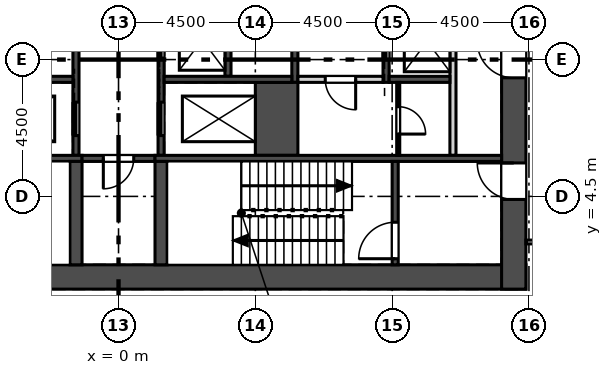
"""IFC4 building model, lengths in metres.
Left out: names, types, materials, properties, quantities, classifications, styles, units other than length and angle.
Written with IfcOpenShell. Run it as: python <this file> out.ifc"""

import sys

from ifc_helpers import new_model, si_unit, direction, frame, frame_2d, origin, place, context, subcontext, project, spatial, rectangle, extrude, element, fill, save


model = new_model("IFC4")
c1 = context("Model", 3, precision=1e-05, world=origin(), true_north=direction((0.0, 1.0)))
c2 = subcontext(c1, "Body", "Model", "MODEL_VIEW")
j1 = project(units=[si_unit("LENGTHUNIT", "METRE"), si_unit("PLANEANGLEUNIT", "RADIAN")], contexts=[c1])
p1 = place(None, origin())
s1 = spatial("IfcSite", under=j1, at=p1, CompositionType="ELEMENT")
p2 = place(p1, origin())
s2 = spatial("IfcBuilding", under=s1, at=p2, CompositionType="ELEMENT")
p3 = place(p2, frame((0.0, 0.0, 335.1)))
s3 = spatial("IfcBuildingStorey", under=s2, at=p3, CompositionType="ELEMENT", Elevation=335.1)
p4 = place(p3, frame((-13.4, 1.85, 0.0), z_axis=(0.0, 0.0, 1.0), x_axis=(1.0, 0.0, 0.0)))
e1 = element("IfcWall", 1, at=p4, inside=s3, PredefinedType="SHEAR", context=c2, shape_type="SweptSolid", body=[
    extrude(rectangle(XDim=26.8, YDim=0.8, at=frame_2d((13.4, 0.0))), origin(), (0.0, 0.0, 1.0), 4.2),
])
p5 = place(p3, frame((13.0, 1.45, 0.0), z_axis=(0.0, 0.0, 1.0), x_axis=(0.0, 1.0, 0.0)))
e2 = element("IfcWall", 2, at=p5, inside=s3, PredefinedType="SHEAR", context=c2, shape_type="SweptSolid", body=[
    extrude(rectangle(XDim=9.442, YDim=0.8, at=frame_2d((4.721, 0.0))), origin(), (0.0, 0.0, 1.0), 4.2),
])
p6 = place(p5, frame((2.95, 0.0, 0.0)))
e3 = element("IfcOpeningElement", 3, at=p6, cuts=e2, PredefinedType="OPENING", context=c2, shape_type="SweptSolid", body=[
    extrude(rectangle(XDim=1.2, YDim=2.1, at=frame_2d((0.6, 1.05))), frame((0.0, 0.41, 0.0), z_axis=(0.0, -1.0, 0.0), x_axis=(1.0, 0.0, 0.0)), (0.0, 0.0, 1.0), 0.82),
])
p7 = place(p5, frame((6.95, 0.0, 0.0)))
e4 = element("IfcOpeningElement", 4, at=p7, cuts=e2, PredefinedType="OPENING", context=c2, shape_type="SweptSolid", body=[
    extrude(rectangle(XDim=1.2, YDim=2.1, at=frame_2d((0.6, 1.05))), frame((0.0, 0.41, 0.0), z_axis=(0.0, -1.0, 0.0), x_axis=(1.0, 0.0, 0.0)), (0.0, 0.0, 1.0), 0.82),
])
p8 = place(p3, frame((23.788, 7.709, 0.0), z_axis=(0.0, 0.0, 1.0), x_axis=(-0.500001731347, 0.866024404189, 0.0)))
e5 = element("IfcWall", 5, at=p8, inside=s3, PredefinedType="SOLIDWALL", context=c2, shape_type="SweptSolid", body=[
    extrude(rectangle(XDim=38.87, YDim=0.34, at=frame_2d((19.435, 0.0))), origin(), (0.0, 0.0, 1.0), 3.8),
])
p9 = place(p8, frame((3.218, 0.0, 0.9)))
e6 = element("IfcOpeningElement", 6, at=p9, cuts=e5, PredefinedType="OPENING", context=c2, shape_type="SweptSolid", body=[
    extrude(rectangle(XDim=1.885, YDim=2.6, at=frame_2d((0.942, 1.3))), frame((0.0, 0.18, 0.0), z_axis=(0.0, -1.0, 0.0), x_axis=(1.0, 0.0, 0.0)), (0.0, 0.0, 1.0), 0.36),
])
p10 = place(p8, frame((6.218, 0.0, 0.9)))
e7 = element("IfcOpeningElement", 7, at=p10, cuts=e5, PredefinedType="OPENING", context=c2, shape_type="SweptSolid", body=[
    extrude(rectangle(XDim=1.885, YDim=2.6, at=frame_2d((0.942, 1.3))), frame((0.0, 0.18, 0.0), z_axis=(0.0, -1.0, 0.0), x_axis=(1.0, 0.0, 0.0)), (0.0, 0.0, 1.0), 0.36),
])
p11 = place(p8, frame((9.218, 0.0, 0.9)))
e8 = element("IfcOpeningElement", 8, at=p11, cuts=e5, PredefinedType="OPENING", context=c2, shape_type="SweptSolid", body=[
    extrude(rectangle(XDim=1.885, YDim=2.6, at=frame_2d((0.942, 1.3))), frame((0.0, 0.18, 0.0), z_axis=(0.0, -1.0, 0.0), x_axis=(1.0, 0.0, 0.0)), (0.0, 0.0, 1.0), 0.36),
])
p12 = place(p8, frame((12.218, 0.0, 0.9)))
e9 = element("IfcOpeningElement", 9, at=p12, cuts=e5, PredefinedType="OPENING", context=c2, shape_type="SweptSolid", body=[
    extrude(rectangle(XDim=1.885, YDim=2.6, at=frame_2d((0.942, 1.3))), frame((0.0, 0.18, 0.0), z_axis=(0.0, -1.0, 0.0), x_axis=(1.0, 0.0, 0.0)), (0.0, 0.0, 1.0), 0.36),
])
p13 = place(p8, frame((15.218, 0.0, 0.9)))
e10 = element("IfcOpeningElement", 10, at=p13, cuts=e5, PredefinedType="OPENING", context=c2, shape_type="SweptSolid", body=[
    extrude(rectangle(XDim=1.885, YDim=2.6, at=frame_2d((0.942, 1.3))), frame((0.0, 0.18, 0.0), z_axis=(0.0, -1.0, 0.0), x_axis=(1.0, 0.0, 0.0)), (0.0, 0.0, 1.0), 0.36),
])
p14 = place(p8, frame((18.218, 0.0, 0.9)))
e11 = element("IfcOpeningElement", 11, at=p14, cuts=e5, PredefinedType="OPENING", context=c2, shape_type="SweptSolid", body=[
    extrude(rectangle(XDim=1.885, YDim=2.6, at=frame_2d((0.942, 1.3))), frame((0.0, 0.18, 0.0), z_axis=(0.0, -1.0, 0.0), x_axis=(1.0, 0.0, 0.0)), (0.0, 0.0, 1.0), 0.36),
])
p15 = place(p8, frame((21.218, 0.0, 0.9)))
e12 = element("IfcOpeningElement", 12, at=p15, cuts=e5, PredefinedType="OPENING", context=c2, shape_type="SweptSolid", body=[
    extrude(rectangle(XDim=1.885, YDim=2.6, at=frame_2d((0.942, 1.3))), frame((0.0, 0.18, 0.0), z_axis=(0.0, -1.0, 0.0), x_axis=(1.0, 0.0, 0.0)), (0.0, 0.0, 1.0), 0.36),
])
p16 = place(p8, frame((24.218, 0.0, 0.9)))
e13 = element("IfcOpeningElement", 13, at=p16, cuts=e5, PredefinedType="OPENING", context=c2, shape_type="SweptSolid", body=[
    extrude(rectangle(XDim=1.885, YDim=2.6, at=frame_2d((0.942, 1.3))), frame((0.0, 0.18, 0.0), z_axis=(0.0, -1.0, 0.0), x_axis=(1.0, 0.0, 0.0)), (0.0, 0.0, 1.0), 0.36),
])
p17 = place(p8, frame((27.218, 0.0, 0.9)))
e14 = element("IfcOpeningElement", 14, at=p17, cuts=e5, PredefinedType="OPENING", context=c2, shape_type="SweptSolid", body=[
    extrude(rectangle(XDim=1.885, YDim=2.6, at=frame_2d((0.942, 1.3))), frame((0.0, 0.18, 0.0), z_axis=(0.0, -1.0, 0.0), x_axis=(1.0, 0.0, 0.0)), (0.0, 0.0, 1.0), 0.36),
])
p18 = place(p8, frame((30.218, 0.0, 0.9)))
e15 = element("IfcOpeningElement", 15, at=p18, cuts=e5, PredefinedType="OPENING", context=c2, shape_type="SweptSolid", body=[
    extrude(rectangle(XDim=1.885, YDim=2.6, at=frame_2d((0.942, 1.3))), frame((0.0, 0.18, 0.0), z_axis=(0.0, -1.0, 0.0), x_axis=(1.0, 0.0, 0.0)), (0.0, 0.0, 1.0), 0.36),
])
p19 = place(p8, frame((33.218, 0.0, 0.9)))
e16 = element("IfcOpeningElement", 16, at=p19, cuts=e5, PredefinedType="OPENING", context=c2, shape_type="SweptSolid", body=[
    extrude(rectangle(XDim=1.885, YDim=2.6, at=frame_2d((0.942, 1.3))), frame((0.0, 0.18, 0.0), z_axis=(0.0, -1.0, 0.0), x_axis=(1.0, 0.0, 0.0)), (0.0, 0.0, 1.0), 0.36),
])
p20 = place(p8, frame((1.051, 0.0, 0.9)))
e17 = element("IfcOpeningElement", 17, at=p20, cuts=e5, PredefinedType="OPENING", context=c2, shape_type="SweptSolid", body=[
    extrude(rectangle(XDim=1.115, YDim=2.4, at=frame_2d((0.558, 1.2))), frame((0.0, 0.18, 0.0), z_axis=(0.0, -1.0, 0.0), x_axis=(1.0, 0.0, 0.0)), (0.0, 0.0, 1.0), 0.36),
])
p21 = place(p8, frame((36.429, 0.0, 0.9)))
e18 = element("IfcOpeningElement", 18, at=p21, cuts=e5, PredefinedType="OPENING", context=c2, shape_type="SweptSolid", body=[
    extrude(rectangle(XDim=1.115, YDim=2.4, at=frame_2d((0.558, 1.2))), frame((0.0, 0.18, 0.0), z_axis=(0.0, -1.0, 0.0), x_axis=(1.0, 0.0, 0.0)), (0.0, 0.0, 1.0), 0.36),
])
p22 = place(p3, frame((11.0, 5.85, 0.0), z_axis=(0.0, 0.0, 1.0), x_axis=(0.0, 1.0, 0.0)))
e19 = element("IfcWall", 19, at=p22, inside=s3, PredefinedType="SOLIDWALL", context=c2, shape_type="SweptSolid", body=[
    extrude(rectangle(XDim=7.4, YDim=0.2, at=frame_2d((3.7, 0.0))), origin(), (0.0, 0.0, 1.0), 3.8),
])
p23 = place(p3, frame((8.8, 8.25, -0.4), z_axis=(0.0, 0.0, 1.0), x_axis=(0.0, 1.0, 0.0)))
e20 = element("IfcWall", 20, at=p23, inside=s3, PredefinedType="SOLIDWALL", context=c2, shape_type="SweptSolid", body=[
    extrude(rectangle(XDim=5.2, YDim=0.2, at=frame_2d((2.6, 0.0))), origin(), (0.0, 0.0, 1.0), 4.2),
])
p24 = place(p23, frame((0.75, 0.0, 0.4)))
e21 = element("IfcOpeningElement", 21, at=p24, cuts=e20, PredefinedType="OPENING", context=c2, shape_type="SweptSolid", body=[
    extrude(rectangle(XDim=1.2, YDim=2.1, at=frame_2d((0.6, 1.05))), frame((0.0, 0.11, 0.0), z_axis=(0.0, -1.0, 0.0), x_axis=(1.0, 0.0, 0.0)), (0.0, 0.0, 1.0), 0.22),
])
p25 = place(p23, frame((3.25, 0.0, 0.4)))
e22 = element("IfcOpeningElement", 22, at=p25, cuts=e20, PredefinedType="OPENING", context=c2, shape_type="SweptSolid", body=[
    extrude(rectangle(XDim=1.2, YDim=2.1, at=frame_2d((0.6, 1.05))), frame((0.0, 0.11, 0.0), z_axis=(0.0, -1.0, 0.0), x_axis=(1.0, 0.0, 0.0)), (0.0, 0.0, 1.0), 0.22),
])
p26 = place(p3, frame((5.8, 8.25, -0.4), z_axis=(0.0, 0.0, 1.0), x_axis=(0.0, 1.0, 0.0)))
e23 = element("IfcWall", 23, at=p26, inside=s3, PredefinedType="SOLIDWALL", context=c2, shape_type="SweptSolid", body=[
    extrude(rectangle(XDim=8.0, YDim=0.2, at=frame_2d((4.0, 0.0))), origin(), (0.0, 0.0, 1.0), 4.2),
])
p27 = place(p26, frame((3.5, 0.0, 0.4)))
e24 = element("IfcOpeningElement", 24, at=p27, cuts=e23, PredefinedType="OPENING", context=c2, shape_type="SweptSolid", body=[
    extrude(rectangle(XDim=1.0, YDim=2.1, at=frame_2d((0.5, 1.05))), frame((0.0, 0.11, 0.0), z_axis=(0.0, -1.0, 0.0), x_axis=(1.0, 0.0, 0.0)), (0.0, 0.0, 1.0), 0.22),
])
p28 = place(p3, frame((3.6, 8.45, -0.4), z_axis=(0.0, 0.0, 1.0), x_axis=(0.0, 1.0, 0.0)))
e25 = element("IfcWall", 25, at=p28, inside=s3, PredefinedType="SOLIDWALL", context=c2, shape_type="SweptSolid", body=[
    extrude(rectangle(XDim=7.8, YDim=0.2, at=frame_2d((3.9, 0.0))), origin(), (0.0, 0.0, 1.0), 4.2),
])
p29 = place(p3, frame((-1.4, 5.85, -0.4), z_axis=(0.0, 0.0, 1.0), x_axis=(0.0, 1.0, 0.0)))
e26 = element("IfcWall", 26, at=p29, inside=s3, PredefinedType="SOLIDWALL", context=c2, shape_type="SweptSolid", body=[
    extrude(rectangle(XDim=11.75, YDim=0.2, at=frame_2d((5.875, 0.0))), origin(), (0.0, 0.0, 1.0), 4.2),
])
p30 = place(p29, frame((0.65, 0.0, 0.4)))
e27 = element("IfcOpeningElement", 27, at=p30, cuts=e26, PredefinedType="OPENING", context=c2, shape_type="SweptSolid", body=[
    extrude(rectangle(XDim=1.1, YDim=2.1, at=frame_2d((0.55, 1.05))), frame((0.0, 0.11, 0.0), z_axis=(0.0, -1.0, 0.0), x_axis=(1.0, 0.0, 0.0)), (0.0, 0.0, 1.0), 0.22),
])
p31 = place(p29, frame((4.6, 0.0, 0.4)))
e28 = element("IfcOpeningElement", 28, at=p31, cuts=e26, PredefinedType="OPENING", context=c2, shape_type="SweptSolid", body=[
    extrude(rectangle(XDim=1.0, YDim=2.1, at=frame_2d((0.5, 1.05))), frame((0.0, 0.11, 0.0), z_axis=(0.0, -1.0, 0.0), x_axis=(1.0, 0.0, 0.0)), (0.0, 0.0, 1.0), 0.22),
])
p32 = place(p29, frame((8.5, 0.0, 0.4)))
e29 = element("IfcOpeningElement", 29, at=p32, cuts=e26, PredefinedType="OPENING", context=c2, shape_type="SweptSolid", body=[
    extrude(rectangle(XDim=1.0, YDim=2.1, at=frame_2d((0.5, 1.05))), frame((0.0, 0.11, 0.0), z_axis=(0.0, -1.0, 0.0), x_axis=(1.0, 0.0, 0.0)), (0.0, 0.0, 1.0), 0.22),
])
p33 = place(p3, frame((1.4, 5.85, -0.4), z_axis=(0.0, 0.0, 1.0), x_axis=(0.0, 1.0, 0.0)))
e30 = element("IfcWall", 30, at=p33, inside=s3, PredefinedType="SOLIDWALL", context=c2, shape_type="SweptSolid", body=[
    extrude(rectangle(XDim=11.75, YDim=0.2, at=frame_2d((5.875, 0.0))), origin(), (0.0, 0.0, 1.0), 4.2),
])
p34 = place(p33, frame((3.2, 0.0, 0.4)))
e31 = element("IfcOpeningElement", 31, at=p34, cuts=e30, PredefinedType="OPENING", context=c2, shape_type="SweptSolid", body=[
    extrude(rectangle(XDim=1.2, YDim=2.1, at=frame_2d((0.6, 1.05))), frame((0.0, 0.11, 0.0), z_axis=(0.0, -1.0, 0.0), x_axis=(1.0, 0.0, 0.0)), (0.0, 0.0, 1.0), 0.22),
])
p35 = place(p33, frame((0.65, 0.0, 0.4)))
e32 = element("IfcOpeningElement", 32, at=p35, cuts=e30, PredefinedType="OPENING", context=c2, shape_type="SweptSolid", body=[
    extrude(rectangle(XDim=1.1, YDim=2.1, at=frame_2d((0.55, 1.05))), frame((0.0, 0.11, 0.0), z_axis=(0.0, -1.0, 0.0), x_axis=(1.0, 0.0, 0.0)), (0.0, 0.0, 1.0), 0.22),
])
p36 = place(p33, frame((5.9, 0.0, 0.4)))
e33 = element("IfcOpeningElement", 33, at=p36, cuts=e30, PredefinedType="OPENING", context=c2, shape_type="SweptSolid", body=[
    extrude(rectangle(XDim=1.0, YDim=2.1, at=frame_2d((0.5, 1.05))), frame((0.0, 0.11, 0.0), z_axis=(0.0, -1.0, 0.0), x_axis=(1.0, 0.0, 0.0)), (0.0, 0.0, 1.0), 0.22),
])
p37 = place(p3, frame((5.2, 5.85, -0.4), z_axis=(0.0, 0.0, 1.0), x_axis=(0.0, 1.0, 0.0)))
e34 = element("IfcWall", 34, at=p37, inside=s3, PredefinedType="SOLIDWALL", context=c2, shape_type="SweptSolid", body=[
    extrude(rectangle(XDim=2.4, YDim=1.4, at=frame_2d((1.2, 0.0))), origin(), (0.0, 0.0, 1.0), 4.2),
])
p38 = place(p3, frame((8.9, 8.35, -0.4), z_axis=(0.0, 0.0, 1.0), x_axis=(1.0, 0.0, 0.0)))
e35 = element("IfcWall", 35, at=p38, inside=s3, PredefinedType="SOLIDWALL", context=c2, shape_type="SweptSolid", body=[
    extrude(rectangle(XDim=2.0, YDim=0.2, at=frame_2d((1.0, 0.0))), origin(), (0.0, 0.0, 1.0), 4.2),
])
for number, where, z_axis, x_axis in (
    (36, (-5.7, 8.35, -0.4), (0.0, 0.0, 1.0), (1.0, 0.0, 0.0)),
    (37, (1.5, 8.35, -0.4), (0.0, 0.0, 1.0), (1.0, 0.0, 0.0)),
):
    element("IfcWall", number, at=place(p3, frame(where, z_axis=z_axis, x_axis=x_axis)), inside=s3, PredefinedType="SOLIDWALL", context=c2, shape_type="SweptSolid", body=[
        extrude(rectangle(XDim=4.2, YDim=0.2, at=frame_2d((2.1, 0.0))), origin(), (0.0, 0.0, 1.0), 4.2),
    ])
p39 = place(p3, frame((-12.6, 5.75, -0.4), z_axis=(0.0, 0.0, 1.0), x_axis=(1.0, 0.0, 0.0)))
e38 = element("IfcWall", 38, at=p39, inside=s3, PredefinedType="SOLIDWALL", context=c2, shape_type="SweptSolid", body=[
    extrude(rectangle(XDim=11.4, YDim=0.2, at=frame_2d((5.7, 0.0))), origin(), (0.0, 0.0, 1.0), 4.2),
])
p40 = place(p3, frame((-1.2, 5.75, -0.4), z_axis=(0.0, 0.0, 1.0), x_axis=(1.0, 0.0, 0.0)))
e39 = element("IfcWall", 39, at=p40, inside=s3, PredefinedType="SOLIDWALL", context=c2, shape_type="SweptSolid", body=[
    extrude(rectangle(XDim=2.4, YDim=0.2, at=frame_2d((1.2, 0.0))), origin(), (0.0, 0.0, 1.0), 4.2),
])
p41 = place(p40, frame((0.7, 0.0, 0.4)))
e40 = element("IfcOpeningElement", 40, at=p41, cuts=e39, PredefinedType="OPENING", context=c2, shape_type="SweptSolid", body=[
    extrude(rectangle(XDim=1.0, YDim=2.1, at=frame_2d((0.5, 1.05))), frame((0.0, 0.11, 0.0), z_axis=(0.0, -1.0, 0.0), x_axis=(1.0, 0.0, 0.0)), (0.0, 0.0, 1.0), 0.22),
])
p42 = place(p3, frame((1.2, 5.75, -0.4), z_axis=(0.0, 0.0, 1.0), x_axis=(1.0, 0.0, 0.0)))
e41 = element("IfcWall", 41, at=p42, inside=s3, PredefinedType="SOLIDWALL", context=c2, shape_type="SweptSolid", body=[
    extrude(rectangle(XDim=11.4, YDim=0.2, at=frame_2d((5.7, 0.0))), origin(), (0.0, 0.0, 1.0), 4.2),
])
p43 = place(p3, frame((9.1, 2.25, -0.4), z_axis=(0.0, 0.0, 1.0), x_axis=(0.0, 1.0, 0.0)))
e42 = element("IfcWall", 42, at=p43, inside=s3, PredefinedType="SOLIDWALL", context=c2, shape_type="SweptSolid", body=[
    extrude(rectangle(XDim=3.4, YDim=0.2, at=frame_2d((1.7, 0.0))), origin(), (0.0, 0.0, 1.0), 4.2),
])
p44 = place(p43, frame((0.2, 0.0, 0.4)))
e43 = element("IfcOpeningElement", 43, at=p44, cuts=e42, PredefinedType="OPENING", context=c2, shape_type="SweptSolid", body=[
    extrude(rectangle(XDim=1.2, YDim=2.1, at=frame_2d((0.6, 1.05))), frame((0.0, 0.11, 0.0), z_axis=(0.0, -1.0, 0.0), x_axis=(1.0, 0.0, 0.0)), (0.0, 0.0, 1.0), 0.22),
])
for number, where, z_axis, x_axis in (
    (44, (-1.4, 2.25, -0.4), (0.0, 0.0, 1.0), (0.0, 1.0, 0.0)),
    (45, (1.4, 2.25, -0.4), (0.0, 0.0, 1.0), (0.0, 1.0, 0.0)),
):
    element("IfcWall", number, at=place(p3, frame(where, z_axis=z_axis, x_axis=x_axis)), inside=s3, PredefinedType="SOLIDWALL", context=c2, shape_type="SweptSolid", body=[
        extrude(rectangle(XDim=3.4, YDim=0.4, at=frame_2d((1.7, 0.0))), origin(), (0.0, 0.0, 1.0), 4.2),
    ])
p45 = place(p3, frame((9.2, 5.85, 0.0), z_axis=(0.0, 0.0, 1.0), x_axis=(0.0, 1.0, 0.0)))
e46 = element("IfcWall", 46, at=p45, inside=s3, PredefinedType="PARTITIONING", context=c2, shape_type="SweptSolid", body=[
    extrude(rectangle(XDim=2.4, YDim=0.1, at=frame_2d((1.2, 0.0))), origin(), (0.0, 0.0, 1.0), 3.8),
])
p46 = place(p45, frame((0.7, 0.0, 0.0)))
e47 = element("IfcOpeningElement", 47, at=p46, cuts=e46, PredefinedType="OPENING", context=c2, shape_type="SweptSolid", body=[
    extrude(rectangle(XDim=0.9, YDim=2.1, at=frame_2d((0.45, 1.05))), frame((0.0, 0.06, 0.0), z_axis=(0.0, -1.0, 0.0), x_axis=(1.0, 0.0, 0.0)), (0.0, 0.0, 1.0), 0.12),
])
p47 = place(p3, frame((5.9, 8.35, 0.0), z_axis=(0.0, 0.0, 1.0), x_axis=(1.0, 0.0, 0.0)))
e48 = element("IfcWall", 48, at=p47, inside=s3, PredefinedType="SOLIDWALL", context=c2, shape_type="SweptSolid", body=[
    extrude(rectangle(XDim=2.8, YDim=0.2, at=frame_2d((1.4, 0.0))), origin(), (0.0, 0.0, 1.0), 3.8),
])
p48 = place(p47, frame((0.9, 0.0, 0.0)))
e49 = element("IfcOpeningElement", 49, at=p48, cuts=e48, PredefinedType="OPENING", context=c2, shape_type="SweptSolid", body=[
    extrude(rectangle(XDim=1.0, YDim=2.1, at=frame_2d((0.5, 1.05))), frame((0.0, 0.11, 0.0), z_axis=(0.0, -1.0, 0.0), x_axis=(1.0, 0.0, 0.0)), (0.0, 0.0, 1.0), 0.22),
])
p49 = place(p3, frame((15.5, 3.0, 0.0), z_axis=(0.0, 0.0, 1.0), x_axis=(-1.0, 0.0, 0.0)))
e50 = element("IfcWall", 50, at=p49, inside=s3, PredefinedType="PARTITIONING", context=c2, shape_type="SweptSolid", body=[
    extrude(rectangle(XDim=2.1, YDim=0.125, at=frame_2d((1.05, 0.0))), origin(), (0.0, 0.0, 1.0), 3.8),
])
p50 = place(p30, origin())
e51 = element("IfcDoor", 51, at=p50, inside=s3, OperationType="SLIDING_TO_RIGHT", PredefinedType="DOOR", context=c2, shape_type="SweptSolid", body=[
    extrude(rectangle(XDim=1.1, YDim=2.1, at=frame_2d((0.55, 1.05))), frame((0.0, 0.025, 0.0), z_axis=(0.0, -1.0, 0.0), x_axis=(1.0, 0.0, 0.0)), (0.0, 0.0, 1.0), 0.05),
])
fill(e27, e51)
p51 = place(p24, origin())
e52 = element("IfcDoor", 52, at=p51, inside=s3, OperationType="SLIDING_TO_LEFT", PredefinedType="DOOR", context=c2, shape_type="SweptSolid", body=[
    extrude(rectangle(XDim=1.2, YDim=2.1, at=frame_2d((0.6, 1.05))), frame((0.0, 0.025, 0.0), z_axis=(0.0, -1.0, 0.0), x_axis=(1.0, 0.0, 0.0)), (0.0, 0.0, 1.0), 0.05),
])
fill(e21, e52)
p52 = place(p34, origin())
e53 = element("IfcDoor", 53, at=p52, inside=s3, OperationType="SLIDING_TO_LEFT", PredefinedType="DOOR", context=c2, shape_type="SweptSolid", body=[
    extrude(rectangle(XDim=1.2, YDim=2.1, at=frame_2d((0.6, 1.05))), frame((0.0, 0.025, 0.0), z_axis=(0.0, -1.0, 0.0), x_axis=(1.0, 0.0, 0.0)), (0.0, 0.0, 1.0), 0.05),
])
fill(e31, e53)
p53 = place(p35, origin())
e54 = element("IfcDoor", 54, at=p53, inside=s3, OperationType="SLIDING_TO_RIGHT", PredefinedType="DOOR", context=c2, shape_type="SweptSolid", body=[
    extrude(rectangle(XDim=1.1, YDim=2.1, at=frame_2d((0.55, 1.05))), frame((0.0, 0.025, 0.0), z_axis=(0.0, -1.0, 0.0), x_axis=(1.0, 0.0, 0.0)), (0.0, 0.0, 1.0), 0.05),
])
fill(e32, e54)
p54 = place(p41, frame((1.0, 0.0, 0.0), z_axis=(0.0, 0.0, 1.0), x_axis=(-1.0, 0.0, 0.0)))
e55 = element("IfcDoor", 55, at=p54, inside=s3, OperationType="SINGLE_SWING_RIGHT", PredefinedType="DOOR", context=c2, shape_type="SweptSolid", body=[
    extrude(rectangle(XDim=1.0, YDim=2.1, at=frame_2d((0.5, 1.05))), frame((0.0, 0.025, 0.0), z_axis=(0.0, -1.0, 0.0), x_axis=(1.0, 0.0, 0.0)), (0.0, 0.0, 1.0), 0.05),
])
fill(e40, e55)
p55 = place(p48, frame((1.0, 0.0, 0.0), z_axis=(0.0, 0.0, 1.0), x_axis=(-1.0, 0.0, 0.0)))
e56 = element("IfcDoor", 56, at=p55, inside=s3, OperationType="SINGLE_SWING_LEFT", PredefinedType="DOOR", context=c2, shape_type="SweptSolid", body=[
    extrude(rectangle(XDim=1.0, YDim=2.1, at=frame_2d((0.5, 1.05))), frame((0.0, 0.025, 0.0), z_axis=(0.0, -1.0, 0.0), x_axis=(1.0, 0.0, 0.0)), (0.0, 0.0, 1.0), 0.05),
])
fill(e49, e56)
p56 = place(p46, frame((0.9, 0.0, 0.0), z_axis=(0.0, 0.0, 1.0), x_axis=(-1.0, 0.0, 0.0)))
e57 = element("IfcDoor", 57, at=p56, inside=s3, OperationType="SINGLE_SWING_RIGHT", PredefinedType="DOOR", context=c2, shape_type="SweptSolid", body=[
    extrude(rectangle(XDim=0.9, YDim=2.1, at=frame_2d((0.45, 1.05))), frame((0.0, 0.025, 0.0), z_axis=(0.0, -1.0, 0.0), x_axis=(1.0, 0.0, 0.0)), (0.0, 0.0, 1.0), 0.05),
])
fill(e47, e57)
p57 = place(p6, origin())
e58 = element("IfcDoor", 58, at=p57, inside=s3, OperationType="SINGLE_SWING_RIGHT", PredefinedType="DOOR", context=c2, shape_type="SweptSolid", body=[
    extrude(rectangle(XDim=1.2, YDim=2.1, at=frame_2d((0.6, 1.05))), frame((0.0, 0.025, 0.0), z_axis=(0.0, -1.0, 0.0), x_axis=(1.0, 0.0, 0.0)), (0.0, 0.0, 1.0), 0.05),
])
fill(e3, e58)
p58 = place(p44, origin())
e59 = element("IfcDoor", 59, at=p58, inside=s3, OperationType="SINGLE_SWING_LEFT", PredefinedType="DOOR", context=c2, shape_type="SweptSolid", body=[
    extrude(rectangle(XDim=1.2, YDim=2.1, at=frame_2d((0.6, 1.05))), frame((0.0, 0.025, 0.0), z_axis=(0.0, -1.0, 0.0), x_axis=(1.0, 0.0, 0.0)), (0.0, 0.0, 1.0), 0.05),
])
fill(e43, e59)
p59 = place(p7, origin())
e60 = element("IfcDoor", 60, at=p59, inside=s3, OperationType="SINGLE_SWING_RIGHT", PredefinedType="DOOR", context=c2, shape_type="SweptSolid", body=[
    extrude(rectangle(XDim=1.2, YDim=2.1, at=frame_2d((0.6, 1.05))), frame((0.0, 0.025, 0.0), z_axis=(0.0, -1.0, 0.0), x_axis=(1.0, 0.0, 0.0)), (0.0, 0.0, 1.0), 0.05),
])
fill(e4, e60)
save(model, sys.argv[1])
